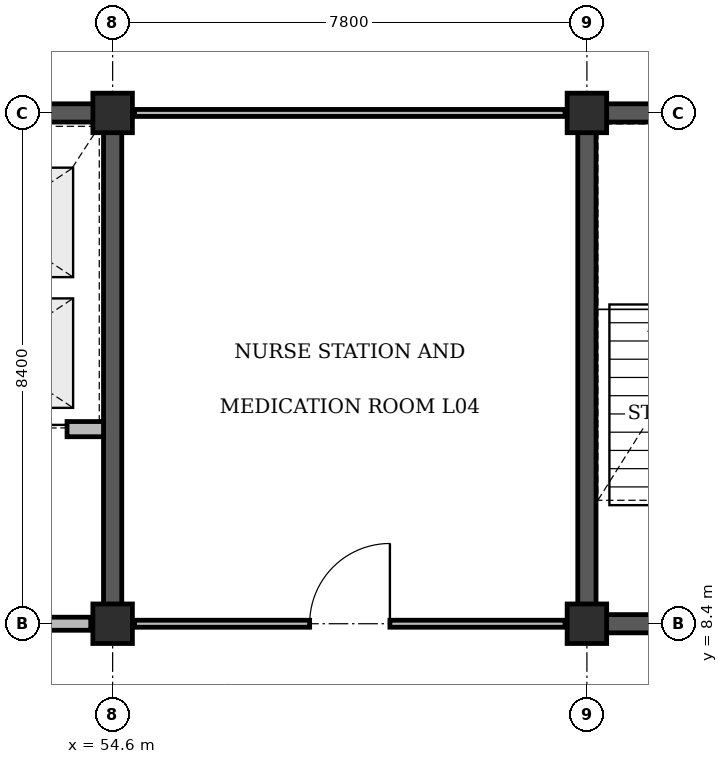
"""IFC4 building model, lengths in metres.
Left out: names, types, materials, properties, quantities, classifications, styles, units other than length and angle.
Written with IfcOpenShell. Run it as: python <this file> out.ifc"""

import sys

from ifc_helpers import new_model, si_unit, direction, frame, frame_2d, origin, origin_2d, place, context, subcontext, project, spatial, rectangle, extrude, element, fill, save


model = new_model("IFC4")
c1 = context("Model", 3, precision=1e-05, world=origin(), true_north=direction((0.0, 1.0)))
c2 = subcontext(c1, "Body", "Model", "MODEL_VIEW")
j1 = project(units=[si_unit("LENGTHUNIT", "METRE"), si_unit("PLANEANGLEUNIT", "RADIAN")], contexts=[c1])
p1 = place(None, origin())
s1 = spatial("IfcSite", under=j1, at=p1, CompositionType="ELEMENT")
p2 = place(p1, origin())
s2 = spatial("IfcBuilding", under=s1, at=p2, CompositionType="ELEMENT")
p3 = place(p2, frame((0.0, 0.0, 18.0)))
s3 = spatial("IfcBuildingStorey", under=s2, at=p3, CompositionType="ELEMENT", Elevation=18.0)
p4 = place(p3, frame((46.65, 16.8, 0.0), z_axis=(0.0, 0.0, 1.0), x_axis=(1.0, 0.0, 0.0)))
e1 = element("IfcWall", 1, at=p4, inside=s3, PredefinedType="SHEAR", context=c2, shape_type="SweptSolid", body=[
    extrude(rectangle(XDim=8.1, YDim=0.3, at=frame_2d((4.05, 0.0))), origin(), (0.0, 0.0, 1.0), 3.92),
])
p5 = place(p3, frame((54.6, 8.4, 0.0), z_axis=(0.0, 0.0, 1.0), x_axis=(0.0, 1.0, 0.0)))
e2 = element("IfcWall", 2, at=p5, inside=s3, PredefinedType="SHEAR", context=c2, shape_type="SweptSolid", body=[
    extrude(rectangle(XDim=8.4, YDim=0.3, at=frame_2d((4.2, 0.0))), origin(), (0.0, 0.0, 1.0), 3.92),
])
p6 = place(p3, frame((62.25, 16.8, 0.0), z_axis=(0.0, 0.0, 1.0), x_axis=(1.0, 0.0, 0.0)))
e3 = element("IfcWall", 3, at=p6, inside=s3, PredefinedType="SHEAR", context=c2, shape_type="SweptSolid", body=[
    extrude(rectangle(XDim=8.1, YDim=0.3, at=frame_2d((4.05, 0.0))), origin(), (0.0, 0.0, 1.0), 3.92),
])
p7 = place(p3, frame((62.4, 8.4, 0.0), z_axis=(0.0, 0.0, 1.0), x_axis=(0.0, 1.0, 0.0)))
e4 = element("IfcWall", 4, at=p7, inside=s3, PredefinedType="SHEAR", context=c2, shape_type="SweptSolid", body=[
    extrude(rectangle(XDim=8.4, YDim=0.3, at=frame_2d((4.2, 0.0))), origin(), (0.0, 0.0, 1.0), 3.92),
])
for number, where, z_axis, x_axis in (
    (5, (54.6, 8.4, 0.0), (0.0, 0.0, 1.0), (1.0, 0.0, 0.0)),
    (6, (54.6, 16.8, 0.0), (0.0, 0.0, 1.0), (1.0, 0.0, 0.0)),
    (7, (62.4, 8.4, 0.0), (0.0, 0.0, 1.0), (1.0, 0.0, 0.0)),
    (8, (62.4, 16.8, 0.0), (0.0, 0.0, 1.0), (1.0, 0.0, 0.0)),
):
    element("IfcColumn", number, at=place(p3, frame(where, z_axis=z_axis, x_axis=x_axis)), inside=s3, PredefinedType="COLUMN", context=c2, shape_type="SweptSolid", body=[
        extrude(rectangle(XDim=0.65, YDim=0.65, at=origin_2d()), origin(), (0.0, 0.0, 1.0), 4.2),
    ])
p8 = place(p3, frame((50.95, 8.4, 0.0), z_axis=(0.0, 0.0, 1.0), x_axis=(1.0, 0.0, 0.0)))
e9 = element("IfcWall", 9, at=p8, inside=s3, PredefinedType="STANDARD", context=c2, shape_type="SweptSolid", body=[
    extrude(rectangle(XDim=3.29, YDim=0.215, at=frame_2d((1.645, 0.0))), origin(), (0.0, 0.0, 1.0), 3.22),
])
p9 = place(p8, frame((0.865, 0.0, 0.0)))
e10 = element("IfcOpeningElement", 10, at=p9, cuts=e9, PredefinedType="OPENING", context=c2, shape_type="SweptSolid", body=[
    extrude(rectangle(XDim=1.56, YDim=2.2, at=frame_2d((0.78, 1.1))), frame((0.0, 0.118, 0.0), z_axis=(0.0, -1.0, 0.0), x_axis=(1.0, 0.0, 0.0)), (0.0, 0.0, 1.0), 0.235),
])
p10 = place(p3, frame((50.95, 11.6, 0.0), z_axis=(0.0, 0.0, 1.0), x_axis=(1.0, 0.0, 0.0)))
e11 = element("IfcWall", 11, at=p10, inside=s3, PredefinedType="STANDARD", context=c2, shape_type="SweptSolid", body=[
    extrude(rectangle(XDim=3.5, YDim=0.25, at=frame_2d((1.75, 0.0))), origin(), (0.0, 0.0, 1.0), 3.9),
])
p11 = place(p10, frame((0.35, 0.0, 0.0)))
e12 = element("IfcOpeningElement", 12, at=p11, cuts=e11, PredefinedType="OPENING", context=c2, shape_type="SweptSolid", body=[
    extrude(rectangle(XDim=1.1, YDim=2.2, at=frame_2d((0.55, 1.1))), frame((0.0, 0.135, 0.0), z_axis=(0.0, -1.0, 0.0), x_axis=(1.0, 0.0, 0.0)), (0.0, 0.0, 1.0), 0.27),
])
p12 = place(p10, frame((1.8, 0.0, 0.0)))
e13 = element("IfcOpeningElement", 13, at=p12, cuts=e11, PredefinedType="OPENING", context=c2, shape_type="SweptSolid", body=[
    extrude(rectangle(XDim=1.1, YDim=2.2, at=frame_2d((0.55, 1.1))), frame((0.0, 0.135, 0.0), z_axis=(0.0, -1.0, 0.0), x_axis=(1.0, 0.0, 0.0)), (0.0, 0.0, 1.0), 0.27),
])
p13 = place(p3, frame((62.4, 8.4, 0.0), z_axis=(0.0, 0.0, 1.0), x_axis=(1.0, 0.0, 0.0)))
e14 = element("IfcWall", 14, at=p13, inside=s3, PredefinedType="SHEAR", context=c2, shape_type="SweptSolid", body=[
    extrude(rectangle(XDim=4.15, YDim=0.3, at=frame_2d((2.075, 0.0))), origin(), (0.0, 0.0, 1.0), 4.2),
])
p14 = place(p13, frame((1.515, 0.0, 0.0)))
e15 = element("IfcOpeningElement", 15, at=p14, cuts=e14, PredefinedType="OPENING", context=c2, shape_type="SweptSolid", body=[
    extrude(rectangle(XDim=1.12, YDim=2.15, at=frame_2d((0.56, 1.075))), frame((0.0, 0.16, 0.0), z_axis=(0.0, -1.0, 0.0), x_axis=(1.0, 0.0, 0.0)), (0.0, 0.0, 1.0), 0.32),
])
p15 = place(p3, frame((54.96, 8.4, 0.0), z_axis=(0.0, 0.0, 1.0), x_axis=(1.0, 0.0, 0.0)))
e16 = element("IfcWall", 16, at=p15, inside=s3, PredefinedType="PARTITIONING", context=c2, shape_type="SweptSolid", body=[
    extrude(rectangle(XDim=7.08, YDim=0.115, at=frame_2d((3.54, 0.0))), origin(), (0.0, 0.0, 1.0), 3.22),
])
p16 = place(p15, frame((2.88, 0.0, 0.0)))
e17 = element("IfcOpeningElement", 17, at=p16, cuts=e16, PredefinedType="OPENING", context=c2, shape_type="SweptSolid", body=[
    extrude(rectangle(XDim=1.32, YDim=2.15, at=frame_2d((0.66, 1.075))), frame((0.0, 0.067, 0.0), z_axis=(0.0, -1.0, 0.0), x_axis=(1.0, 0.0, 0.0)), (0.0, 0.0, 1.0), 0.135),
])
p17 = place(p3, frame((54.96, 16.8, 0.0), z_axis=(0.0, 0.0, 1.0), x_axis=(1.0, 0.0, 0.0)))
e18 = element("IfcWall", 18, at=p17, inside=s3, PredefinedType="PARTITIONING", context=c2, shape_type="SweptSolid", body=[
    extrude(rectangle(XDim=7.08, YDim=0.115, at=frame_2d((3.54, 0.0))), origin(), (0.0, 0.0, 1.0), 3.22),
])
p18 = place(p12, origin())
e19 = element("IfcDoor", 19, at=p18, inside=s3, OperationType="SLIDING_TO_LEFT", PredefinedType="DOOR", context=c2, shape_type="SweptSolid", body=[
    extrude(rectangle(XDim=1.1, YDim=2.2, at=frame_2d((0.55, 1.1))), frame((0.0, 0.025, 0.0), z_axis=(0.0, -1.0, 0.0), x_axis=(1.0, 0.0, 0.0)), (0.0, 0.0, 1.0), 0.05),
])
fill(e13, e19)
p19 = place(p16, origin())
e20 = element("IfcDoor", 20, at=p19, inside=s3, OperationType="SINGLE_SWING_RIGHT", PredefinedType="DOOR", context=c2, shape_type="SweptSolid", body=[
    extrude(rectangle(XDim=1.32, YDim=2.15, at=frame_2d((0.66, 1.075))), frame((0.0, 0.025, 0.0), z_axis=(0.0, -1.0, 0.0), x_axis=(1.0, 0.0, 0.0)), (0.0, 0.0, 1.0), 0.05),
])
fill(e17, e20)
save(model, sys.argv[1])
